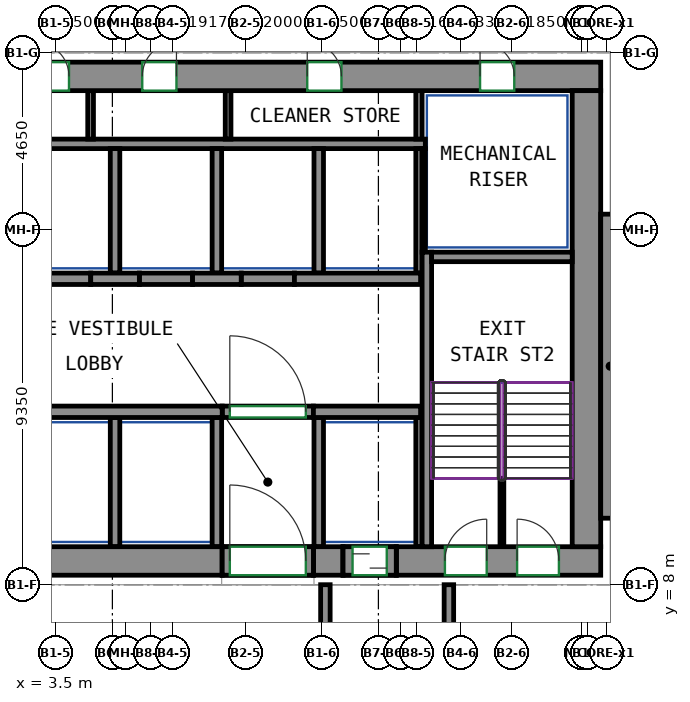
"""IFC4 building model, lengths in metres.
Left out: names, types, materials, properties, quantities, classifications, styles, units other than length and angle.
Written with IfcOpenShell. Run it as: python <this file> out.ifc"""

import sys

from ifc_helpers import new_model, si_unit, direction, frame, frame_2d, origin, place, context, subcontext, project, spatial, rectangle, extrude, source, transform, mapped, element, fill, save


model = new_model("IFC4")
c1 = context("Model", 3, precision=1e-05, world=origin(), true_north=direction((0.0, 1.0)))
c2 = subcontext(c1, "Body", "Model", "MODEL_VIEW")
j1 = project(units=[si_unit("LENGTHUNIT", "METRE"), si_unit("PLANEANGLEUNIT", "RADIAN")], contexts=[c1])
p1 = place(None, origin())
s1 = spatial("IfcSite", under=j1, at=p1, CompositionType="ELEMENT")
p2 = place(p1, origin())
s2 = spatial("IfcBuilding", under=s1, at=p2, CompositionType="ELEMENT")
p3 = place(p2, frame((0.0, 0.0, 223.7)))
s3 = spatial("IfcBuildingStorey", under=s2, at=p3, CompositionType="ELEMENT", Elevation=223.7)
m1 = source(origin(), c2, "Body", "SweptSolid", [
    extrude(rectangle(XDim=14.18, YDim=0.75, at=frame_2d((7.09, 0.0))), origin(), (0.0, 0.0, 1.0), 9.5),
])
p4 = place(p3, frame((-6.29, 8.625, 0.0), z_axis=(0.0, 0.0, 1.0), x_axis=(1.0, 0.0, 0.0)))
e1 = element("IfcWall", 1, at=p4, inside=s3, PredefinedType="SHEAR", context=c2, shape_type="MappedRepresentation", body=[
    mapped(m1, transform((0.0, 0.0, 0.0))),
])
m2 = source(origin(), c2, "Body", "SweptSolid", [
    extrude(rectangle(XDim=0.78, YDim=0.75, at=frame_2d((0.39, 0.0))), origin(), (0.0, 0.0, 1.0), 9.5),
])
p5 = place(p3, frame((10.29, 8.625, 0.0), z_axis=(0.0, 0.0, 1.0), x_axis=(1.0, 0.0, 0.0)))
e2 = element("IfcWall", 2, at=p5, inside=s3, PredefinedType="SHEAR", context=c2, shape_type="MappedRepresentation", body=[
    mapped(m2, transform((0.0, 0.0, 0.0))),
])
m3 = source(origin(), c2, "Body", "SweptSolid", [
    extrude(rectangle(XDim=5.38, YDim=0.75, at=frame_2d((2.69, 0.0))), origin(), (0.0, 0.0, 1.0), 9.5),
])
p6 = place(p3, frame((12.47, 8.625, 0.0), z_axis=(0.0, 0.0, 1.0), x_axis=(1.0, 0.0, 0.0)))
e3 = element("IfcWall", 3, at=p6, inside=s3, PredefinedType="SHEAR", context=c2, shape_type="MappedRepresentation", body=[
    mapped(m3, transform((0.0, 0.0, 0.0))),
])
p7 = place(p6, frame((1.28, 0.0, 0.0)))
e4 = element("IfcOpeningElement", 4, at=p7, cuts=e3, PredefinedType="OPENING", context=c2, shape_type="SweptSolid", body=[
    extrude(rectangle(XDim=1.1, YDim=2.1, at=frame_2d((0.55, 1.05))), frame((0.0, 0.385, 0.0), z_axis=(0.0, -1.0, 0.0), x_axis=(1.0, 0.0, 0.0)), (0.0, 0.0, 1.0), 0.77),
])
p8 = place(p6, frame((3.18, 0.0, 0.0)))
e5 = element("IfcOpeningElement", 5, at=p8, cuts=e3, PredefinedType="OPENING", context=c2, shape_type="SweptSolid", body=[
    extrude(rectangle(XDim=1.1, YDim=2.1, at=frame_2d((0.55, 1.05))), frame((0.0, 0.385, 0.0), z_axis=(0.0, -1.0, 0.0), x_axis=(1.0, 0.0, 0.0)), (0.0, 0.0, 1.0), 0.77),
])
m4 = source(origin(), c2, "Body", "SweptSolid", [
    extrude(rectangle(XDim=33.6, YDim=0.75, at=frame_2d((16.8, 0.0))), origin(), (0.0, 0.0, 1.0), 9.5),
])
p9 = place(p3, frame((-15.75, 21.375, 0.0), z_axis=(0.0, 0.0, 1.0), x_axis=(1.0, 0.0, 0.0)))
e6 = element("IfcWall", 6, at=p9, inside=s3, PredefinedType="SHEAR", context=c2, shape_type="MappedRepresentation", body=[
    mapped(m4, transform((0.0, 0.0, 0.0))),
])
p10 = place(p9, frame((6.581, 0.0, 0.0)))
e7 = element("IfcOpeningElement", 7, at=p10, cuts=e6, PredefinedType="OPENING", context=c2, shape_type="SweptSolid", body=[
    extrude(rectangle(XDim=0.9, YDim=2.1, at=frame_2d((0.45, 1.05))), frame((0.0, 0.385, 0.0), z_axis=(0.0, -1.0, 0.0), x_axis=(1.0, 0.0, 0.0)), (0.0, 0.0, 1.0), 0.77),
])
p11 = place(p9, frame((11.888, 0.0, 0.0)))
e8 = element("IfcOpeningElement", 8, at=p11, cuts=e6, PredefinedType="OPENING", context=c2, shape_type="SweptSolid", body=[
    extrude(rectangle(XDim=0.9, YDim=2.1, at=frame_2d((0.45, 1.05))), frame((0.0, 0.385, 0.0), z_axis=(0.0, -1.0, 0.0), x_axis=(1.0, 0.0, 0.0)), (0.0, 0.0, 1.0), 0.77),
])
p12 = place(p9, frame((16.296, 0.0, 0.0)))
e9 = element("IfcOpeningElement", 9, at=p12, cuts=e6, PredefinedType="OPENING", context=c2, shape_type="SweptSolid", body=[
    extrude(rectangle(XDim=0.9, YDim=2.1, at=frame_2d((0.45, 1.05))), frame((0.0, 0.385, 0.0), z_axis=(0.0, -1.0, 0.0), x_axis=(1.0, 0.0, 0.0)), (0.0, 0.0, 1.0), 0.77),
])
p13 = place(p9, frame((18.708, 0.0, 0.0)))
e10 = element("IfcOpeningElement", 10, at=p13, cuts=e6, PredefinedType="OPENING", context=c2, shape_type="SweptSolid", body=[
    extrude(rectangle(XDim=0.9, YDim=2.1, at=frame_2d((0.45, 1.05))), frame((0.0, 0.385, 0.0), z_axis=(0.0, -1.0, 0.0), x_axis=(1.0, 0.0, 0.0)), (0.0, 0.0, 1.0), 0.77),
])
p14 = place(p9, frame((21.536, 0.0, 0.0)))
e11 = element("IfcOpeningElement", 11, at=p14, cuts=e6, PredefinedType="OPENING", context=c2, shape_type="SweptSolid", body=[
    extrude(rectangle(XDim=0.9, YDim=2.1, at=frame_2d((0.45, 1.05))), frame((0.0, 0.385, 0.0), z_axis=(0.0, -1.0, 0.0), x_axis=(1.0, 0.0, 0.0)), (0.0, 0.0, 1.0), 0.77),
])
p15 = place(p9, frame((25.877, 0.0, 0.0)))
e12 = element("IfcOpeningElement", 12, at=p15, cuts=e6, PredefinedType="OPENING", context=c2, shape_type="SweptSolid", body=[
    extrude(rectangle(XDim=0.9, YDim=2.1, at=frame_2d((0.45, 1.05))), frame((0.0, 0.385, 0.0), z_axis=(0.0, -1.0, 0.0), x_axis=(1.0, 0.0, 0.0)), (0.0, 0.0, 1.0), 0.77),
])
p16 = place(p9, frame((2.275, 0.0, 0.0)))
e13 = element("IfcOpeningElement", 13, at=p16, cuts=e6, PredefinedType="OPENING", context=c2, shape_type="SweptSolid", body=[
    extrude(rectangle(XDim=0.9, YDim=2.1, at=frame_2d((0.45, 1.05))), frame((0.0, 0.385, 0.0), z_axis=(0.0, -1.0, 0.0), x_axis=(1.0, 0.0, 0.0)), (0.0, 0.0, 1.0), 0.77),
])
p17 = place(p9, frame((30.425, 0.0, 0.0)))
e14 = element("IfcOpeningElement", 14, at=p17, cuts=e6, PredefinedType="OPENING", context=c2, shape_type="SweptSolid", body=[
    extrude(rectangle(XDim=0.9, YDim=2.1, at=frame_2d((0.45, 1.05))), frame((0.0, 0.385, 0.0), z_axis=(0.0, -1.0, 0.0), x_axis=(1.0, 0.0, 0.0)), (0.0, 0.0, 1.0), 0.77),
])
m5 = source(origin(), c2, "Body", "SweptSolid", [
    extrude(rectangle(XDim=12.0, YDim=0.75, at=frame_2d((6.0, 0.0))), origin(), (0.0, 0.0, 1.0), 9.5),
])
p18 = place(p3, frame((17.475, 9.0, 0.0), z_axis=(0.0, 0.0, 1.0), x_axis=(0.0, 1.0, 0.0)))
e15 = element("IfcWall", 15, at=p18, inside=s3, PredefinedType="SHEAR", context=c2, shape_type="MappedRepresentation", body=[
    mapped(m5, transform((0.0, 0.0, 0.0))),
])
m6 = source(origin(), c2, "Body", "SweptSolid", [
    extrude(rectangle(XDim=7.75, YDim=0.25, at=frame_2d((3.875, 0.0))), origin(), (0.0, 0.0, 1.0), 9.5),
])
p19 = place(p3, frame((13.275, 9.0, 0.0), z_axis=(0.0, 0.0, 1.0), x_axis=(0.0, 1.0, 0.0)))
e16 = element("IfcWall", 16, at=p19, inside=s3, PredefinedType="SHEAR", context=c2, shape_type="MappedRepresentation", body=[
    mapped(m6, transform((0.0, 0.0, 0.0))),
])
m7 = source(origin(), c2, "Body", "SweptSolid", [
    extrude(rectangle(XDim=3.7, YDim=0.25, at=frame_2d((1.85, 0.0))), origin(), (0.0, 0.0, 1.0), 9.5),
])
p20 = place(p3, frame((13.4, 16.625, 0.0), z_axis=(0.0, 0.0, 1.0), x_axis=(1.0, 0.0, 0.0)))
e17 = element("IfcWall", 17, at=p20, inside=s3, PredefinedType="SHEAR", context=c2, shape_type="MappedRepresentation", body=[
    mapped(m7, transform((0.0, 0.0, 0.0))),
])
m8 = source(origin(), c2, "Body", "SweptSolid", [
    extrude(rectangle(XDim=8.0, YDim=0.5, at=frame_2d((4.0, 0.0))), origin(), (0.0, 0.0, 1.0), 9.5),
])
p21 = place(p3, frame((18.1, 9.75, 0.0), z_axis=(0.0, 0.0, 1.0), x_axis=(0.0, 1.0, 0.0)))
e18 = element("IfcWall", 18, at=p21, inside=s3, PredefinedType="SHEAR", context=c2, shape_type="MappedRepresentation", body=[
    mapped(m8, transform((0.0, 0.0, 0.0))),
])
m9 = source(origin(), c2, "Body", "SweptSolid", [
    extrude(rectangle(XDim=18.9, YDim=0.3, at=frame_2d((9.45, 0.0))), origin(), (0.0, 0.0, 1.0), 9.5),
])
p22 = place(p3, frame((-11.01, 12.55, 0.0), z_axis=(0.0, 0.0, 1.0), x_axis=(1.0, 0.0, 0.0)))
e19 = element("IfcWall", 19, at=p22, inside=s3, PredefinedType="SHEAR", context=c2, shape_type="MappedRepresentation", body=[
    mapped(m9, transform((0.0, 0.0, 0.0))),
])
m10 = source(origin(), c2, "Body", "SweptSolid", [
    extrude(rectangle(XDim=2.82, YDim=0.3, at=frame_2d((1.41, 0.0))), origin(), (0.0, 0.0, 1.0), 9.5),
])
p23 = place(p3, frame((10.29, 12.55, 0.0), z_axis=(0.0, 0.0, 1.0), x_axis=(1.0, 0.0, 0.0)))
e20 = element("IfcWall", 20, at=p23, inside=s3, PredefinedType="SHEAR", context=c2, shape_type="MappedRepresentation", body=[
    mapped(m10, transform((0.0, 0.0, 0.0))),
])
m11 = source(origin(), c2, "Body", "SweptSolid", [
    extrude(rectangle(XDim=1.28, YDim=0.3, at=frame_2d((0.64, 0.0))), origin(), (0.0, 0.0, 1.0), 9.5),
])
p24 = place(p3, frame((4.43, 16.05, 0.0), z_axis=(0.0, 0.0, 1.0), x_axis=(1.0, 0.0, 0.0)))
e21 = element("IfcWall", 21, at=p24, inside=s3, PredefinedType="SHEAR", context=c2, shape_type="MappedRepresentation", body=[
    mapped(m11, transform((0.0, 0.0, 0.0))),
])
m12 = source(origin(), c2, "Body", "SweptSolid", [
    extrude(rectangle(XDim=1.28, YDim=0.3, at=frame_2d((0.64, 0.0))), origin(), (0.0, 0.0, 1.0), 9.5),
])
p25 = place(p3, frame((7.11, 16.05, 0.0), z_axis=(0.0, 0.0, 1.0), x_axis=(1.0, 0.0, 0.0)))
e22 = element("IfcWall", 22, at=p25, inside=s3, PredefinedType="SHEAR", context=c2, shape_type="MappedRepresentation", body=[
    mapped(m12, transform((0.0, 0.0, 0.0))),
])
m13 = source(origin(), c2, "Body", "SweptSolid", [
    extrude(rectangle(XDim=3.32, YDim=0.3, at=frame_2d((1.66, 0.0))), origin(), (0.0, 0.0, 1.0), 9.5),
])
p26 = place(p3, frame((9.79, 16.05, 0.0), z_axis=(0.0, 0.0, 1.0), x_axis=(1.0, 0.0, 0.0)))
e23 = element("IfcWall", 23, at=p26, inside=s3, PredefinedType="SHEAR", context=c2, shape_type="MappedRepresentation", body=[
    mapped(m13, transform((0.0, 0.0, 0.0))),
])
m14 = source(origin(), c2, "Body", "SweptSolid", [
    extrude(rectangle(XDim=2.4, YDim=0.75, at=frame_2d((1.2, 0.0))), origin(), (0.0, 0.0, 1.0), 5.3),
])
p27 = place(p3, frame((7.89, 8.625, 4.2), z_axis=(0.0, 0.0, 1.0), x_axis=(1.0, 0.0, 0.0)))
e24 = element("IfcWall", 24, at=p27, inside=s3, PredefinedType="SHEAR", context=c2, shape_type="MappedRepresentation", body=[
    mapped(m14, transform((0.0, 0.0, 0.0))),
])
m15 = source(origin(), c2, "Body", "SweptSolid", [
    extrude(rectangle(XDim=1.4, YDim=0.75, at=frame_2d((0.7, 0.0))), origin(), (0.0, 0.0, 1.0), 5.55),
])
p28 = place(p3, frame((11.07, 8.625, 3.95), z_axis=(0.0, 0.0, 1.0), x_axis=(1.0, 0.0, 0.0)))
e25 = element("IfcWall", 25, at=p28, inside=s3, PredefinedType="SHEAR", context=c2, shape_type="MappedRepresentation", body=[
    mapped(m15, transform((0.0, 0.0, 0.0))),
])
m16 = source(origin(), c2, "Body", "SweptSolid", [
    extrude(rectangle(XDim=2.4, YDim=0.3, at=frame_2d((1.2, 0.0))), origin(), (0.0, 0.0, 1.0), 9.5),
])
p29 = place(p3, frame((7.89, 12.55, 0.0), z_axis=(0.0, 0.0, 1.0), x_axis=(1.0, 0.0, 0.0)))
e26 = element("IfcWall", 26, at=p29, inside=s3, PredefinedType="PARTITIONING", context=c2, shape_type="MappedRepresentation", body=[
    mapped(m16, transform((0.0, 0.0, 0.0))),
])
p30 = place(p29, frame((0.2, 0.0, 0.0)))
e27 = element("IfcOpeningElement", 27, at=p30, cuts=e26, PredefinedType="OPENING", context=c2, shape_type="SweptSolid", body=[
    extrude(rectangle(XDim=2.0, YDim=2.1, at=frame_2d((1.0, 1.05))), frame((0.0, 0.16, 0.0), z_axis=(0.0, -1.0, 0.0), x_axis=(1.0, 0.0, 0.0)), (0.0, 0.0, 1.0), 0.32),
])
m17 = source(origin(), c2, "Body", "SweptSolid", [
    extrude(rectangle(XDim=1.4, YDim=0.3, at=frame_2d((0.7, 0.0))), origin(), (0.0, 0.0, 1.0), 9.5),
])
p31 = place(p3, frame((3.03, 16.05, 0.0), z_axis=(0.0, 0.0, 1.0), x_axis=(1.0, 0.0, 0.0)))
e28 = element("IfcWall", 28, at=p31, inside=s3, PredefinedType="PARTITIONING", context=c2, shape_type="MappedRepresentation", body=[
    mapped(m17, transform((0.0, 0.0, 0.0))),
])
m18 = source(origin(), c2, "Body", "SweptSolid", [
    extrude(rectangle(XDim=1.4, YDim=0.3, at=frame_2d((0.7, 0.0))), origin(), (0.0, 0.0, 1.0), 9.5),
])
for number, where, z_axis, x_axis in (
    (29, (5.71, 16.05, 0.0), (0.0, 0.0, 1.0), (1.0, 0.0, 0.0)),
    (30, (8.39, 16.05, 0.0), (0.0, 0.0, 1.0), (1.0, 0.0, 0.0)),
):
    element("IfcWall", number, at=place(p3, frame(where, z_axis=z_axis, x_axis=x_axis)), inside=s3, PredefinedType="PARTITIONING", context=c2, shape_type="MappedRepresentation", body=[
        mapped(m18, transform((0.0, 0.0, 0.0))),
    ])
m19 = source(origin(), c2, "Body", "SweptSolid", [
    extrude(rectangle(XDim=2.65, YDim=0.25, at=frame_2d((1.325, 0.0))), origin(), (0.0, 0.0, 1.0), 9.5),
])
for number, where, z_axis, x_axis in (
    (31, (10.605, 5.35, 0.0), (0.0, 0.0, 1.0), (0.0, 1.0, 0.0)),
    (32, (13.855, 5.35, 0.0), (0.0, 0.0, 1.0), (0.0, 1.0, 0.0)),
):
    element("IfcWall", number, at=place(p3, frame(where, z_axis=z_axis, x_axis=x_axis)), inside=s3, PredefinedType="PARTITIONING", context=c2, shape_type="MappedRepresentation", body=[
        mapped(m19, transform((0.0, 0.0, 0.0))),
    ])
m20 = source(origin(), c2, "Body", "SweptSolid", [
    extrude(rectangle(XDim=10.97, YDim=0.25, at=frame_2d((5.485, 0.0))), origin(), (0.0, 0.0, 1.0), 9.5),
])
p32 = place(p3, frame((2.265, 19.6, 0.0), z_axis=(0.0, 0.0, 1.0), x_axis=(1.0, 0.0, 0.0)))
e33 = element("IfcWall", 33, at=p32, inside=s3, PredefinedType="PARTITIONING", context=c2, shape_type="MappedRepresentation", body=[
    mapped(m20, transform((0.0, 0.0, 0.0))),
])
m21 = source(origin(), c2, "Body", "SweptSolid", [
    extrude(rectangle(XDim=3.275, YDim=0.165, at=frame_2d((1.638, 0.0))), origin(), (0.0, 0.0, 1.0), 9.5),
])
p33 = place(p3, frame((13.067, 16.2, 0.0), z_axis=(0.0, 0.0, 1.0), x_axis=(0.0, 1.0, 0.0)))
e34 = element("IfcWall", 34, at=p33, inside=s3, PredefinedType="PARTITIONING", context=c2, shape_type="MappedRepresentation", body=[
    mapped(m21, transform((0.0, 0.0, 0.0))),
])
m22 = source(origin(), c2, "Body", "SweptSolid", [
    extrude(rectangle(XDim=1.275, YDim=0.165, at=frame_2d((0.637, 0.0))), origin(), (0.0, 0.0, 1.0), 9.5),
])
p34 = place(p3, frame((13.067, 19.725, 0.0), z_axis=(0.0, 0.0, 1.0), x_axis=(0.0, 1.0, 0.0)))
e35 = element("IfcWall", 35, at=p34, inside=s3, PredefinedType="PARTITIONING", context=c2, shape_type="MappedRepresentation", body=[
    mapped(m22, transform((0.0, 0.0, 0.0))),
])
m23 = source(origin(), c2, "Body", "SweptSolid", [
    extrude(rectangle(XDim=3.275, YDim=0.25, at=frame_2d((1.638, 0.0))), origin(), (0.0, 0.0, 1.0), 9.5),
])
p35 = place(p3, frame((10.43, 16.2, 0.0), z_axis=(0.0, 0.0, 1.0), x_axis=(0.0, 1.0, 0.0)))
e36 = element("IfcWall", 36, at=p35, inside=s3, PredefinedType="PARTITIONING", context=c2, shape_type="MappedRepresentation", body=[
    mapped(m23, transform((0.0, 0.0, 0.0))),
])
m24 = source(origin(), c2, "Body", "SweptSolid", [
    extrude(rectangle(XDim=2.725, YDim=0.085, at=frame_2d((1.363, 0.0))), origin(), (0.0, 0.0, 1.0), 9.5),
])
p36 = place(p3, frame((13.192, 16.75, 0.0), z_axis=(0.0, 0.0, 1.0), x_axis=(0.0, 1.0, 0.0)))
e37 = element("IfcWall", 37, at=p36, inside=s3, PredefinedType="PARTITIONING", context=c2, shape_type="MappedRepresentation", body=[
    mapped(m24, transform((0.0, 0.0, 0.0))),
])
for number, where, z_axis, x_axis in (
    (38, (5.07, 16.2, 0.0), (0.0, 0.0, 1.0), (0.0, 1.0, 0.0)),
    (39, (7.75, 16.2, 0.0), (0.0, 0.0, 1.0), (0.0, 1.0, 0.0)),
):
    element("IfcWall", number, at=place(p3, frame(where, z_axis=z_axis, x_axis=x_axis)), inside=s3, PredefinedType="PARTITIONING", context=c2, shape_type="MappedRepresentation", body=[
        mapped(m23, transform((0.0, 0.0, 0.0))),
    ])
m25 = source(origin(), c2, "Body", "SweptSolid", [
    extrude(rectangle(XDim=3.4, YDim=0.25, at=frame_2d((1.7, 0.0))), origin(), (0.0, 0.0, 1.0), 9.5),
])
p37 = place(p3, frame((10.43, 9.0, 0.0), z_axis=(0.0, 0.0, 1.0), x_axis=(0.0, 1.0, 0.0)))
e40 = element("IfcWall", 40, at=p37, inside=s3, PredefinedType="PARTITIONING", context=c2, shape_type="MappedRepresentation", body=[
    mapped(m25, transform((0.0, 0.0, 0.0))),
])
m26 = source(origin(), c2, "Body", "SweptSolid", [
    extrude(rectangle(XDim=3.4, YDim=0.165, at=frame_2d((1.7, 0.0))), origin(), (0.0, 0.0, 1.0), 9.5),
])
p38 = place(p3, frame((13.067, 9.0, 0.0), z_axis=(0.0, 0.0, 1.0), x_axis=(0.0, 1.0, 0.0)))
e41 = element("IfcWall", 41, at=p38, inside=s3, PredefinedType="PARTITIONING", context=c2, shape_type="MappedRepresentation", body=[
    mapped(m26, transform((0.0, 0.0, 0.0))),
])
for number, where, z_axis, x_axis in (
    (42, (5.07, 9.0, 0.0), (0.0, 0.0, 1.0), (0.0, 1.0, 0.0)),
    (43, (7.75, 9.0, 0.0), (0.0, 0.0, 1.0), (0.0, 1.0, 0.0)),
):
    element("IfcWall", number, at=place(p3, frame(where, z_axis=z_axis, x_axis=x_axis)), inside=s3, PredefinedType="PARTITIONING", context=c2, shape_type="MappedRepresentation", body=[
        mapped(m25, transform((0.0, 0.0, 0.0))),
    ])
m27 = source(origin(), c2, "Body", "SweptSolid", [
    extrude(rectangle(XDim=1.275, YDim=0.15, at=frame_2d((0.637, 0.0))), origin(), (0.0, 0.0, 1.0), 9.5),
])
for number, where, z_axis, x_axis in (
    (44, (4.427, 19.725, 0.0), (0.0, 0.0, 1.0), (0.0, 1.0, 0.0)),
    (45, (8.045, 19.725, 0.0), (0.0, 0.0, 1.0), (0.0, 1.0, 0.0)),
):
    element("IfcWall", number, at=place(p3, frame(where, z_axis=z_axis, x_axis=x_axis)), inside=s3, PredefinedType="PARTITIONING", context=c2, shape_type="MappedRepresentation", body=[
        mapped(m27, transform((0.0, 0.0, 0.0))),
    ])
m28 = source(origin(), c2, "Body", "SweptSolid", [
    extrude(rectangle(XDim=2.4, YDim=0.75, at=frame_2d((1.2, 0.0))), origin(), (0.0, 0.0, 1.0), 2.7),
])
p39 = place(p3, frame((7.89, 8.625, 0.0), z_axis=(0.0, 0.0, 1.0), x_axis=(1.0, 0.0, 0.0)))
e46 = element("IfcWall", 46, at=p39, inside=s3, PredefinedType="PARTITIONING", context=c2, shape_type="MappedRepresentation", body=[
    mapped(m28, transform((0.0, 0.0, 0.0))),
])
p40 = place(p39, frame((0.2, 0.0, 0.0)))
e47 = element("IfcOpeningElement", 47, at=p40, cuts=e46, PredefinedType="OPENING", context=c2, shape_type="SweptSolid", body=[
    extrude(rectangle(XDim=2.0, YDim=2.1, at=frame_2d((1.0, 1.05))), frame((0.0, 0.385, 0.0), z_axis=(0.0, -1.0, 0.0), x_axis=(1.0, 0.0, 0.0)), (0.0, 0.0, 1.0), 0.77),
])
m29 = source(origin(), c2, "Body", "SweptSolid", [
    extrude(rectangle(XDim=1.4, YDim=0.75, at=frame_2d((0.7, 0.0))), origin(), (0.0, 0.0, 1.0), 2.7),
])
p41 = place(p3, frame((11.07, 8.625, 0.0), z_axis=(0.0, 0.0, 1.0), x_axis=(1.0, 0.0, 0.0)))
e48 = element("IfcWall", 48, at=p41, inside=s3, PredefinedType="PARTITIONING", context=c2, shape_type="MappedRepresentation", body=[
    mapped(m29, transform((0.0, 0.0, 0.0))),
])
p42 = place(p41, frame((0.25, 0.0, 0.0)))
e49 = element("IfcOpeningElement", 49, at=p42, cuts=e48, PredefinedType="OPENING", context=c2, shape_type="SweptSolid", body=[
    extrude(rectangle(XDim=0.9, YDim=2.1, at=frame_2d((0.45, 1.05))), frame((0.0, 0.385, 0.0), z_axis=(0.0, -1.0, 0.0), x_axis=(1.0, 0.0, 0.0)), (0.0, 0.0, 1.0), 0.77),
])
m30 = source(origin(), c2, "Body", "SweptSolid", [
    extrude(rectangle(XDim=1.8, YDim=0.1, at=frame_2d((0.9, 0.0))), origin(), (0.0, 0.0, 1.0), 3.1),
])
p43 = place(p3, frame((15.25, 9.0, 0.0), z_axis=(0.0, 0.0, 1.0), x_axis=(0.0, 1.0, 0.0)))
e50 = element("IfcWall", 50, at=p43, inside=s3, PredefinedType="PARTITIONING", context=c2, shape_type="MappedRepresentation", body=[
    mapped(m30, transform((0.0, 0.0, 0.0))),
])
p44 = place(p30, origin())
e51 = element("IfcDoor", 51, at=p44, inside=s3, OperationType="DOUBLE_DOOR_SINGLE_SWING", PredefinedType="DOOR", context=c2, shape_type="SweptSolid", body=[
    extrude(rectangle(XDim=2.0, YDim=2.1, at=frame_2d((1.0, 1.05))), frame((0.0, 0.025, 0.0), z_axis=(0.0, -1.0, 0.0), x_axis=(1.0, 0.0, 0.0)), (0.0, 0.0, 1.0), 0.05),
])
fill(e27, e51)
p45 = place(p40, origin())
e52 = element("IfcDoor", 52, at=p45, inside=s3, OperationType="DOUBLE_DOOR_SINGLE_SWING", PredefinedType="DOOR", context=c2, shape_type="SweptSolid", body=[
    extrude(rectangle(XDim=2.0, YDim=2.1, at=frame_2d((1.0, 1.05))), frame((0.0, 0.28, 0.0), z_axis=(0.0, -1.0, 0.0), x_axis=(1.0, 0.0, 0.0)), (0.0, 0.0, 1.0), 0.05),
])
fill(e47, e52)
p46 = place(p42, origin())
e53 = element("IfcDoor", 53, at=p46, inside=s3, OperationType="SLIDING_TO_LEFT", PredefinedType="DOOR", context=c2, shape_type="SweptSolid", body=[
    extrude(rectangle(XDim=0.9, YDim=2.1, at=frame_2d((0.45, 1.05))), frame((0.0, 0.28, 0.0), z_axis=(0.0, -1.0, 0.0), x_axis=(1.0, 0.0, 0.0)), (0.0, 0.0, 1.0), 0.05),
])
fill(e49, e53)
p47 = place(p13, origin())
e54 = element("IfcDoor", 54, at=p47, inside=s3, OperationType="SINGLE_SWING_LEFT", PredefinedType="DOOR", context=c2, shape_type="SweptSolid", body=[
    extrude(rectangle(XDim=0.9, YDim=2.1, at=frame_2d((0.45, 1.05))), frame((0.0, -0.23, 0.0), z_axis=(0.0, -1.0, 0.0), x_axis=(1.0, 0.0, 0.0)), (0.0, 0.0, 1.0), 0.05),
])
fill(e10, e54)
p48 = place(p14, origin())
e55 = element("IfcDoor", 55, at=p48, inside=s3, OperationType="SINGLE_SWING_RIGHT", PredefinedType="DOOR", context=c2, shape_type="SweptSolid", body=[
    extrude(rectangle(XDim=0.9, YDim=2.1, at=frame_2d((0.45, 1.05))), frame((0.0, -0.23, 0.0), z_axis=(0.0, -1.0, 0.0), x_axis=(1.0, 0.0, 0.0)), (0.0, 0.0, 1.0), 0.05),
])
fill(e11, e55)
p49 = place(p15, origin())
e56 = element("IfcDoor", 56, at=p49, inside=s3, OperationType="SINGLE_SWING_LEFT", PredefinedType="DOOR", context=c2, shape_type="SweptSolid", body=[
    extrude(rectangle(XDim=0.9, YDim=2.1, at=frame_2d((0.45, 1.05))), frame((0.0, -0.23, 0.0), z_axis=(0.0, -1.0, 0.0), x_axis=(1.0, 0.0, 0.0)), (0.0, 0.0, 1.0), 0.05),
])
fill(e12, e56)
p50 = place(p17, origin())
e57 = element("IfcDoor", 57, at=p50, inside=s3, OperationType="SINGLE_SWING_LEFT", PredefinedType="DOOR", context=c2, shape_type="SweptSolid", body=[
    extrude(rectangle(XDim=0.9, YDim=2.1, at=frame_2d((0.45, 1.05))), frame((0.0, -0.23, 0.0), z_axis=(0.0, -1.0, 0.0), x_axis=(1.0, 0.0, 0.0)), (0.0, 0.0, 1.0), 0.05),
])
fill(e14, e57)
p51 = place(p7, origin())
e58 = element("IfcDoor", 58, at=p51, inside=s3, OperationType="SINGLE_SWING_RIGHT", PredefinedType="DOOR", context=c2, shape_type="SweptSolid", body=[
    extrude(rectangle(XDim=1.1, YDim=2.1, at=frame_2d((0.55, 1.05))), frame((0.0, 0.28, 0.0), z_axis=(0.0, -1.0, 0.0), x_axis=(1.0, 0.0, 0.0)), (0.0, 0.0, 1.0), 0.05),
])
fill(e4, e58)
p52 = place(p8, origin())
e59 = element("IfcDoor", 59, at=p52, inside=s3, OperationType="SINGLE_SWING_LEFT", PredefinedType="DOOR", context=c2, shape_type="SweptSolid", body=[
    extrude(rectangle(XDim=1.1, YDim=2.1, at=frame_2d((0.55, 1.05))), frame((0.0, 0.28, 0.0), z_axis=(0.0, -1.0, 0.0), x_axis=(1.0, 0.0, 0.0)), (0.0, 0.0, 1.0), 0.05),
])
fill(e5, e59)
save(model, sys.argv[1])
